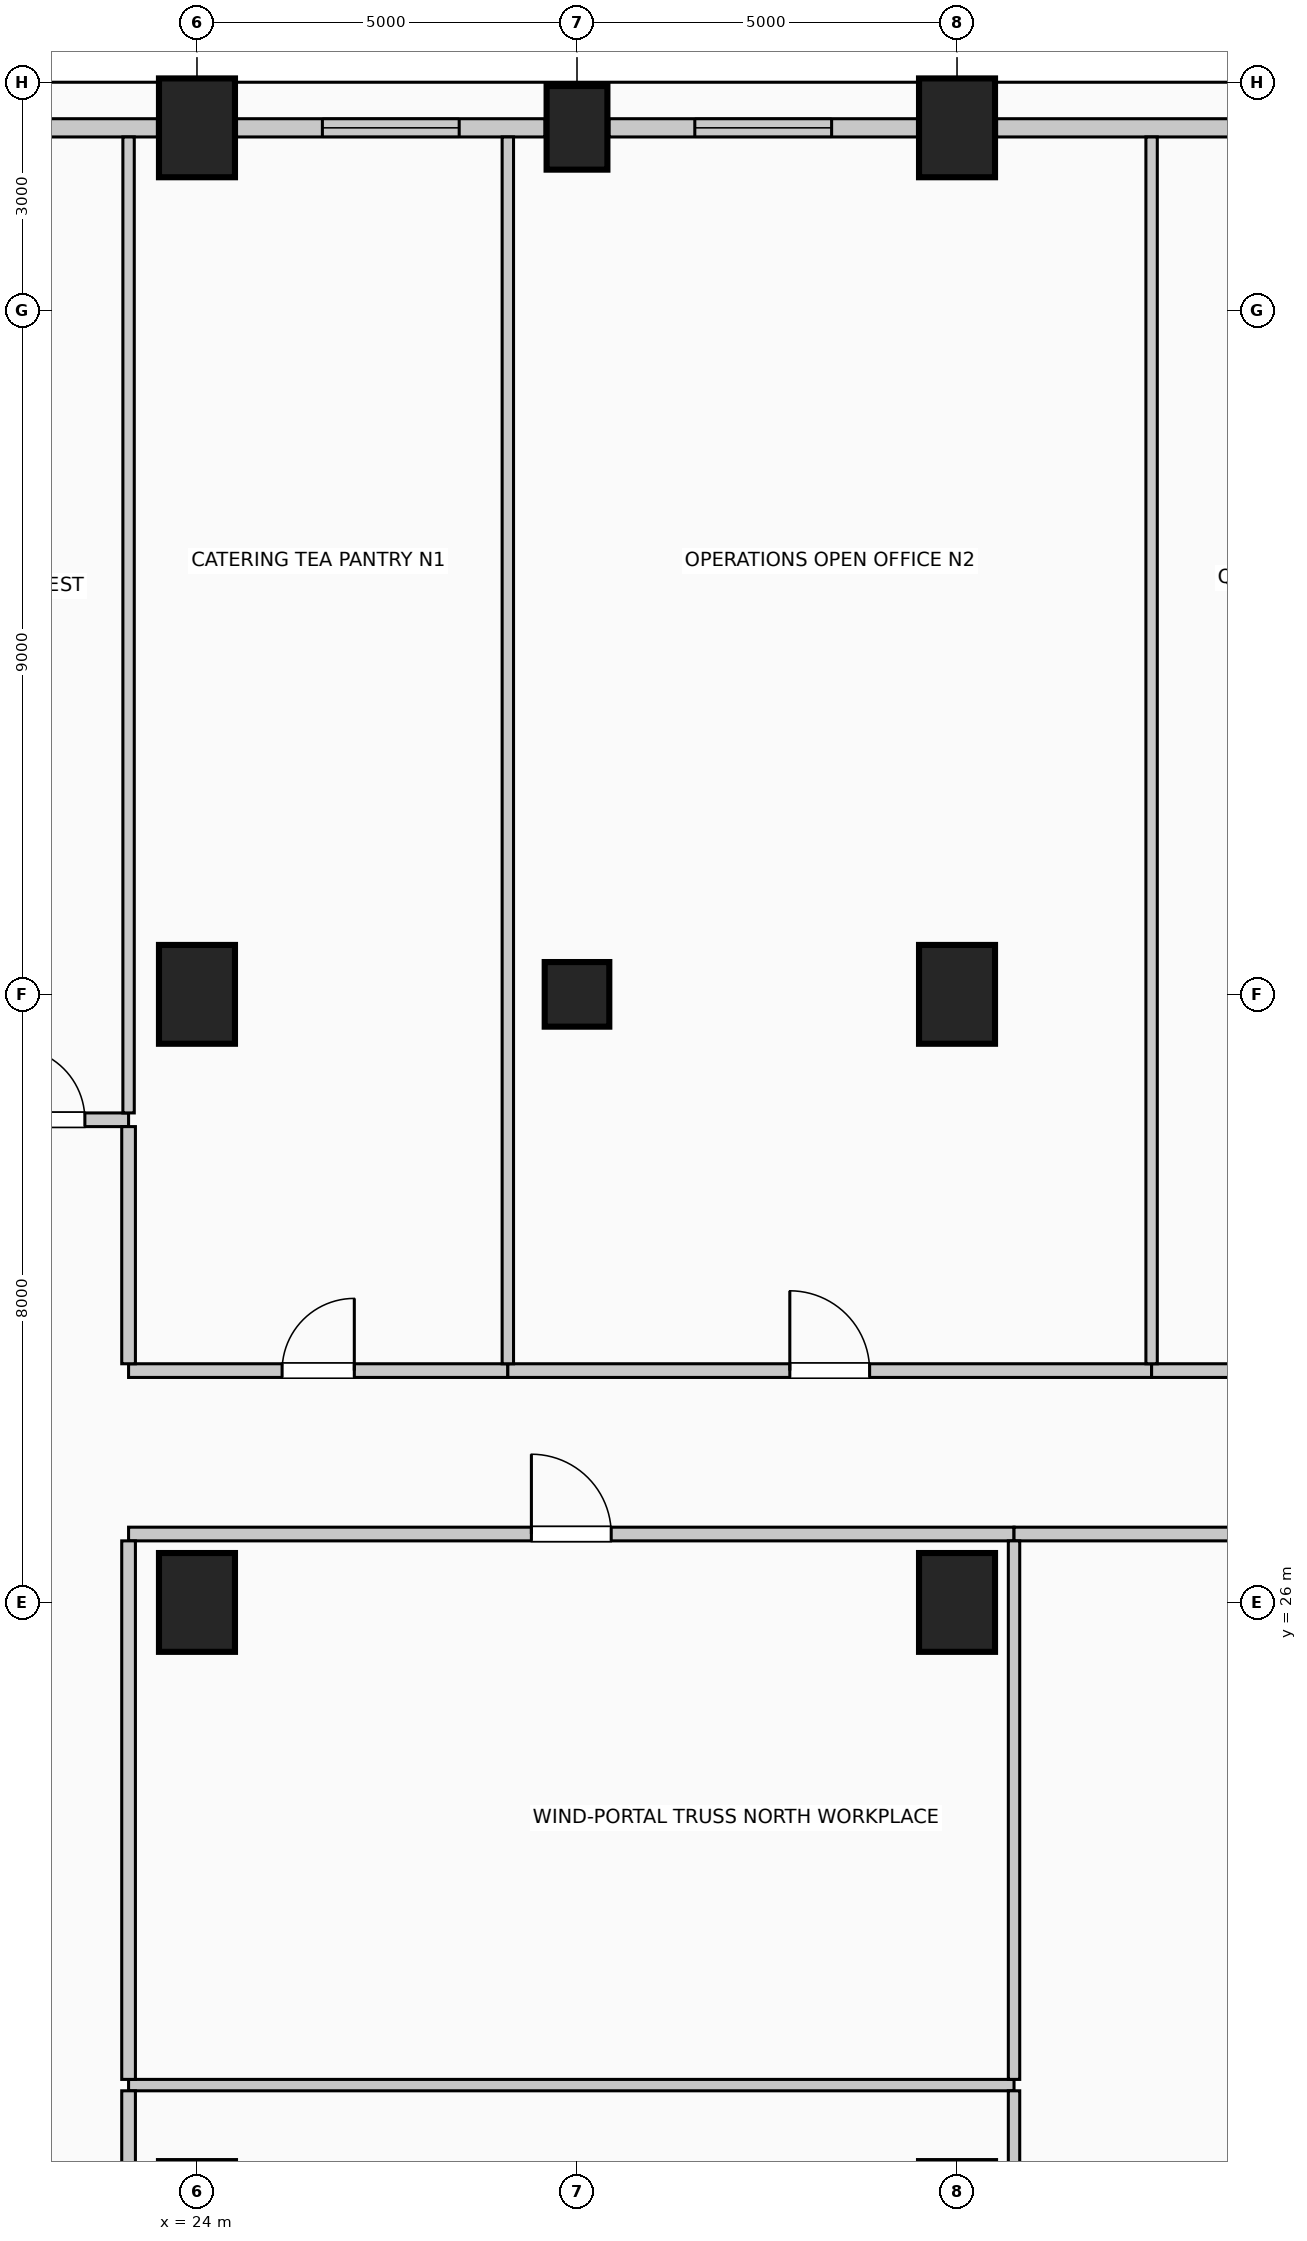
"""IFC4 building model, lengths in metres.
Left out: names, types, materials, properties, quantities, classifications, styles, units other than length and angle.
Written with IfcOpenShell. Run it as: python <this file> out.ifc"""

import sys

from ifc_helpers import new_model, si_unit, direction, frame, frame_2d, origin, origin_2d, place, context, subcontext, project, spatial, rectangle, circle, extrude, element, fill, save


model = new_model("IFC4")
c1 = context("Model", 3, precision=1e-05, world=origin(), true_north=direction((0.0, 1.0)))
c2 = subcontext(c1, "Body", "Model", "MODEL_VIEW")
j1 = project(units=[si_unit("LENGTHUNIT", "METRE"), si_unit("PLANEANGLEUNIT", "RADIAN")], contexts=[c1])
p1 = place(None, origin())
s1 = spatial("IfcSite", under=j1, at=p1, CompositionType="ELEMENT")
p2 = place(p1, origin())
s2 = spatial("IfcBuilding", under=s1, at=p2, CompositionType="ELEMENT")
p3 = place(p2, frame((0.0, 0.0, 214.6)))
s3 = spatial("IfcBuildingStorey", under=s2, at=p3, CompositionType="ELEMENT", Elevation=214.6)
p4 = place(p3, frame((24.0, 45.4, 0.0), z_axis=(0.0, 0.0, 1.0), x_axis=(1.0, 0.0, 0.0)))
e1 = element("IfcColumn", 1, at=p4, inside=s3, PredefinedType="COLUMN", context=c2, shape_type="SweptSolid", body=[
    extrude(rectangle(XDim=1.0, YDim=1.3, at=origin_2d()), origin(), (0.0, 0.0, 1.0), 4.0),
])
p5 = place(p3, frame((29.0, 45.4, 0.0), z_axis=(0.0, 0.0, 1.0), x_axis=(1.0, 0.0, 0.0)))
e2 = element("IfcColumn", 2, at=p5, inside=s3, PredefinedType="COLUMN", context=c2, shape_type="SweptSolid", body=[
    extrude(rectangle(XDim=0.8, YDim=1.1, at=origin_2d()), origin(), (0.0, 0.0, 1.0), 4.0),
])
for number, where, z_axis, x_axis in (
    (3, (34.0, 45.4, 0.0), (0.0, 0.0, 1.0), (1.0, 0.0, 0.0)),
    (4, (24.0, 18.0, 0.0), (0.0, 0.0, 1.0), (1.0, 0.0, 0.0)),
    (5, (34.0, 18.0, 0.0), (0.0, 0.0, 1.0), (1.0, 0.0, 0.0)),
    (6, (24.0, 26.0, 0.0), (0.0, 0.0, 1.0), (1.0, 0.0, 0.0)),
    (7, (34.0, 26.0, 0.0), (0.0, 0.0, 1.0), (1.0, 0.0, 0.0)),
    (8, (24.0, 34.0, 0.0), (0.0, 0.0, 1.0), (1.0, 0.0, 0.0)),
    (9, (34.0, 34.0, 0.0), (0.0, 0.0, 1.0), (1.0, 0.0, 0.0)),
):
    element("IfcColumn", number, at=place(p3, frame(where, z_axis=z_axis, x_axis=x_axis)), inside=s3, PredefinedType="COLUMN", context=c2, shape_type="SweptSolid", body=[
        extrude(rectangle(XDim=1.0, YDim=1.3, at=origin_2d()), origin(), (0.0, 0.0, 1.0), 4.0),
    ])
p6 = place(p3, frame((29.0, 34.0, 0.0), z_axis=(0.0, 0.0, 1.0), x_axis=(1.0, 0.0, 0.0)))
e10 = element("IfcColumn", 10, at=p6, inside=s3, PredefinedType="COLUMN", context=c2, shape_type="SweptSolid", body=[
    extrude(circle(Radius=0.425, at=origin_2d()), origin(), (0.0, 0.0, 1.0), 4.0),
])
p7 = place(p3, frame((16.92, 45.4, 0.0), z_axis=(0.0, 0.0, 1.0), x_axis=(1.0, 0.0, 0.0)))
e11 = element("IfcWall", 11, at=p7, inside=s3, PredefinedType="SOLIDWALL", context=c2, shape_type="SweptSolid", body=[
    extrude(rectangle(XDim=6.56, YDim=0.24, at=frame_2d((3.28, 0.0))), origin(), (0.0, 0.0, 1.0), 3.0),
])
p8 = place(p7, frame((0.987, 0.0, 0.42)))
e12 = element("IfcOpeningElement", 12, at=p8, cuts=e11, PredefinedType="OPENING", context=c2, shape_type="SweptSolid", body=[
    extrude(rectangle(XDim=1.8, YDim=2.2, at=frame_2d((0.9, 1.1))), frame((0.0, 0.13, 0.0), z_axis=(0.0, -1.0, 0.0), x_axis=(1.0, 0.0, 0.0)), (0.0, 0.0, 1.0), 0.26),
])
p9 = place(p3, frame((24.52, 45.4, 0.0), z_axis=(0.0, 0.0, 1.0), x_axis=(1.0, 0.0, 0.0)))
e13 = element("IfcWall", 13, at=p9, inside=s3, PredefinedType="SOLIDWALL", context=c2, shape_type="SweptSolid", body=[
    extrude(rectangle(XDim=4.06, YDim=0.24, at=frame_2d((2.03, 0.0))), origin(), (0.0, 0.0, 1.0), 3.0),
])
p10 = place(p9, frame((1.13, 0.0, 0.42)))
e14 = element("IfcOpeningElement", 14, at=p10, cuts=e13, PredefinedType="OPENING", context=c2, shape_type="SweptSolid", body=[
    extrude(rectangle(XDim=1.8, YDim=2.2, at=frame_2d((0.9, 1.1))), frame((0.0, 0.13, 0.0), z_axis=(0.0, -1.0, 0.0), x_axis=(1.0, 0.0, 0.0)), (0.0, 0.0, 1.0), 0.26),
])
p11 = place(p3, frame((29.42, 45.4, 0.0), z_axis=(0.0, 0.0, 1.0), x_axis=(1.0, 0.0, 0.0)))
e15 = element("IfcWall", 15, at=p11, inside=s3, PredefinedType="SOLIDWALL", context=c2, shape_type="SweptSolid", body=[
    extrude(rectangle(XDim=4.06, YDim=0.24, at=frame_2d((2.03, 0.0))), origin(), (0.0, 0.0, 1.0), 3.0),
])
p12 = place(p11, frame((1.13, 0.0, 0.42)))
e16 = element("IfcOpeningElement", 16, at=p12, cuts=e15, PredefinedType="OPENING", context=c2, shape_type="SweptSolid", body=[
    extrude(rectangle(XDim=1.8, YDim=2.2, at=frame_2d((0.9, 1.1))), frame((0.0, 0.13, 0.0), z_axis=(0.0, -1.0, 0.0), x_axis=(1.0, 0.0, 0.0)), (0.0, 0.0, 1.0), 0.26),
])
p13 = place(p3, frame((34.52, 45.4, 0.0), z_axis=(0.0, 0.0, 1.0), x_axis=(1.0, 0.0, 0.0)))
e17 = element("IfcWall", 17, at=p13, inside=s3, PredefinedType="SOLIDWALL", context=c2, shape_type="SweptSolid", body=[
    extrude(rectangle(XDim=6.56, YDim=0.24, at=frame_2d((3.28, 0.0))), origin(), (0.0, 0.0, 1.0), 3.0),
])
p14 = place(p3, frame((23.1, 19.65, 0.0), z_axis=(0.0, 0.0, 1.0), x_axis=(1.0, 0.0, 0.0)))
e18 = element("IfcWall", 18, at=p14, inside=s3, PredefinedType="PARTITIONING", context=c2, shape_type="SweptSolid", body=[
    extrude(rectangle(XDim=11.65, YDim=0.15, at=frame_2d((5.825, 0.0))), origin(), (0.0, 0.0, 1.0), 3.75),
])
p15 = place(p3, frame((23.1, 26.9, 0.0), z_axis=(0.0, 0.0, 1.0), x_axis=(1.0, 0.0, 0.0)))
e19 = element("IfcWall", 19, at=p15, inside=s3, PredefinedType="PARTITIONING", context=c2, shape_type="SweptSolid", body=[
    extrude(rectangle(XDim=11.65, YDim=0.18, at=frame_2d((5.825, 0.0))), origin(), (0.0, 0.0, 1.0), 3.75),
])
p16 = place(p15, frame((5.3, 0.0, 0.0)))
e20 = element("IfcOpeningElement", 20, at=p16, cuts=e19, PredefinedType="OPENING", context=c2, shape_type="SweptSolid", body=[
    extrude(rectangle(XDim=1.05, YDim=2.15, at=frame_2d((0.525, 1.075))), frame((0.0, 0.1, 0.0), z_axis=(0.0, -1.0, 0.0), x_axis=(1.0, 0.0, 0.0)), (0.0, 0.0, 1.0), 0.2),
])
p17 = place(p3, frame((34.75, 26.9, 0.0), z_axis=(0.0, 0.0, 1.0), x_axis=(1.0, 0.0, 0.0)))
e21 = element("IfcWall", 21, at=p17, inside=s3, PredefinedType="PARTITIONING", context=c2, shape_type="SweptSolid", body=[
    extrude(rectangle(XDim=22.53, YDim=0.18, at=frame_2d((11.265, 0.0))), origin(), (0.0, 0.0, 1.0), 3.75),
])
p18 = place(p3, frame((23.1, 29.05, 0.0), z_axis=(0.0, 0.0, 1.0), x_axis=(1.0, 0.0, 0.0)))
e22 = element("IfcWall", 22, at=p18, inside=s3, PredefinedType="PARTITIONING", context=c2, shape_type="SweptSolid", body=[
    extrude(rectangle(XDim=4.99, YDim=0.18, at=frame_2d((2.495, 0.0))), origin(), (0.0, 0.0, 1.0), 3.75),
])
p19 = place(p18, frame((2.02, 0.0, 0.0)))
e23 = element("IfcOpeningElement", 23, at=p19, cuts=e22, PredefinedType="OPENING", context=c2, shape_type="SweptSolid", body=[
    extrude(rectangle(XDim=0.95, YDim=2.15, at=frame_2d((0.475, 1.075))), frame((0.0, 0.1, 0.0), z_axis=(0.0, -1.0, 0.0), x_axis=(1.0, 0.0, 0.0)), (0.0, 0.0, 1.0), 0.2),
])
p20 = place(p3, frame((28.09, 29.05, 0.0), z_axis=(0.0, 0.0, 1.0), x_axis=(1.0, 0.0, 0.0)))
e24 = element("IfcWall", 24, at=p20, inside=s3, PredefinedType="PARTITIONING", context=c2, shape_type="SweptSolid", body=[
    extrude(rectangle(XDim=8.47, YDim=0.18, at=frame_2d((4.235, 0.0))), origin(), (0.0, 0.0, 1.0), 3.75),
])
p21 = place(p20, frame((3.71, 0.0, 0.0)))
e25 = element("IfcOpeningElement", 25, at=p21, cuts=e24, PredefinedType="OPENING", context=c2, shape_type="SweptSolid", body=[
    extrude(rectangle(XDim=1.05, YDim=2.15, at=frame_2d((0.525, 1.075))), frame((0.0, 0.1, 0.0), z_axis=(0.0, -1.0, 0.0), x_axis=(1.0, 0.0, 0.0)), (0.0, 0.0, 1.0), 0.2),
])
p22 = place(p3, frame((36.56, 29.05, 0.0), z_axis=(0.0, 0.0, 1.0), x_axis=(1.0, 0.0, 0.0)))
e26 = element("IfcWall", 26, at=p22, inside=s3, PredefinedType="PARTITIONING", context=c2, shape_type="SweptSolid", body=[
    extrude(rectangle(XDim=4.99, YDim=0.18, at=frame_2d((2.495, 0.0))), origin(), (0.0, 0.0, 1.0), 3.75),
])
p23 = place(p22, frame((2.02, 0.0, 0.0)))
e27 = element("IfcOpeningElement", 27, at=p23, cuts=e26, PredefinedType="OPENING", context=c2, shape_type="SweptSolid", body=[
    extrude(rectangle(XDim=0.95, YDim=2.15, at=frame_2d((0.475, 1.075))), frame((0.0, 0.1, 0.0), z_axis=(0.0, -1.0, 0.0), x_axis=(1.0, 0.0, 0.0)), (0.0, 0.0, 1.0), 0.2),
])
p24 = place(p3, frame((21.0, 32.35, 0.0), z_axis=(0.0, 0.0, 1.0), x_axis=(1.0, 0.0, 0.0)))
e28 = element("IfcWall", 28, at=p24, inside=s3, PredefinedType="PARTITIONING", context=c2, shape_type="SweptSolid", body=[
    extrude(rectangle(XDim=2.1, YDim=0.18, at=frame_2d((1.05, 0.0))), origin(), (0.0, 0.0, 1.0), 3.75),
])
p25 = place(p24, frame((0.575, 0.0, 0.0)))
e29 = element("IfcOpeningElement", 29, at=p25, cuts=e28, PredefinedType="OPENING", context=c2, shape_type="SweptSolid", body=[
    extrude(rectangle(XDim=0.95, YDim=2.15, at=frame_2d((0.475, 1.075))), frame((0.0, 0.1, 0.0), z_axis=(0.0, -1.0, 0.0), x_axis=(1.0, 0.0, 0.0)), (0.0, 0.0, 1.0), 0.2),
])
p26 = place(p3, frame((23.1, 16.39, 0.0), z_axis=(0.0, 0.0, 1.0), x_axis=(0.0, 1.0, 0.0)))
e30 = element("IfcWall", 30, at=p26, inside=s3, PredefinedType="PARTITIONING", context=c2, shape_type="SweptSolid", body=[
    extrude(rectangle(XDim=3.185, YDim=0.18, at=frame_2d((1.593, 0.0))), origin(), (0.0, 0.0, 1.0), 3.75),
])
p27 = place(p3, frame((23.1, 19.725, 0.0), z_axis=(0.0, 0.0, 1.0), x_axis=(0.0, 1.0, 0.0)))
e31 = element("IfcWall", 31, at=p27, inside=s3, PredefinedType="PARTITIONING", context=c2, shape_type="SweptSolid", body=[
    extrude(rectangle(XDim=7.085, YDim=0.18, at=frame_2d((3.542, 0.0))), origin(), (0.0, 0.0, 1.0), 3.75),
])
p28 = place(p3, frame((23.1, 29.14, 0.0), z_axis=(0.0, 0.0, 1.0), x_axis=(0.0, 1.0, 0.0)))
e32 = element("IfcWall", 32, at=p28, inside=s3, PredefinedType="PARTITIONING", context=c2, shape_type="SweptSolid", body=[
    extrude(rectangle(XDim=3.12, YDim=0.18, at=frame_2d((1.56, 0.0))), origin(), (0.0, 0.0, 1.0), 3.75),
])
p29 = place(p3, frame((23.1, 32.44, 0.0), z_axis=(0.0, 0.0, 1.0), x_axis=(0.0, 1.0, 0.0)))
e33 = element("IfcWall", 33, at=p29, inside=s3, PredefinedType="PARTITIONING", context=c2, shape_type="SweptSolid", body=[
    extrude(rectangle(XDim=12.84, YDim=0.15, at=frame_2d((6.42, 0.0))), origin(), (0.0, 0.0, 1.0), 3.75),
])
p30 = place(p3, frame((28.09, 29.14, 0.0), z_axis=(0.0, 0.0, 1.0), x_axis=(0.0, 1.0, 0.0)))
e34 = element("IfcWall", 34, at=p30, inside=s3, PredefinedType="PARTITIONING", context=c2, shape_type="SweptSolid", body=[
    extrude(rectangle(XDim=16.14, YDim=0.15, at=frame_2d((8.07, 0.0))), origin(), (0.0, 0.0, 1.0), 3.75),
])
p31 = place(p3, frame((34.75, 16.39, 0.0), z_axis=(0.0, 0.0, 1.0), x_axis=(0.0, 1.0, 0.0)))
e35 = element("IfcWall", 35, at=p31, inside=s3, PredefinedType="PARTITIONING", context=c2, shape_type="SweptSolid", body=[
    extrude(rectangle(XDim=3.185, YDim=0.15, at=frame_2d((1.593, 0.0))), origin(), (0.0, 0.0, 1.0), 3.75),
])
p32 = place(p3, frame((34.75, 19.725, 0.0), z_axis=(0.0, 0.0, 1.0), x_axis=(0.0, 1.0, 0.0)))
e36 = element("IfcWall", 36, at=p32, inside=s3, PredefinedType="PARTITIONING", context=c2, shape_type="SweptSolid", body=[
    extrude(rectangle(XDim=7.085, YDim=0.15, at=frame_2d((3.542, 0.0))), origin(), (0.0, 0.0, 1.0), 3.75),
])
p33 = place(p3, frame((36.56, 29.14, 0.0), z_axis=(0.0, 0.0, 1.0), x_axis=(0.0, 1.0, 0.0)))
e37 = element("IfcWall", 37, at=p33, inside=s3, PredefinedType="PARTITIONING", context=c2, shape_type="SweptSolid", body=[
    extrude(rectangle(XDim=16.14, YDim=0.15, at=frame_2d((8.07, 0.0))), origin(), (0.0, 0.0, 1.0), 3.75),
])
p34 = place(p10, origin())
e38 = element("IfcWindow", 38, at=p34, inside=s3, PartitioningType="SINGLE_PANEL", PredefinedType="WINDOW", context=c2, shape_type="SweptSolid", body=[
    extrude(rectangle(XDim=1.8, YDim=2.2, at=frame_2d((0.9, 1.1))), frame((0.0, 0.03, 0.0), z_axis=(0.0, -1.0, 0.0), x_axis=(1.0, 0.0, 0.0)), (0.0, 0.0, 1.0), 0.06),
])
fill(e14, e38)
p35 = place(p12, origin())
e39 = element("IfcWindow", 39, at=p35, inside=s3, PartitioningType="SINGLE_PANEL", PredefinedType="WINDOW", context=c2, shape_type="SweptSolid", body=[
    extrude(rectangle(XDim=1.8, YDim=2.2, at=frame_2d((0.9, 1.1))), frame((0.0, 0.03, 0.0), z_axis=(0.0, -1.0, 0.0), x_axis=(1.0, 0.0, 0.0)), (0.0, 0.0, 1.0), 0.06),
])
fill(e16, e39)
p36 = place(p16, origin())
e40 = element("IfcDoor", 40, at=p36, inside=s3, OperationType="SINGLE_SWING_LEFT", PredefinedType="DOOR", context=c2, shape_type="SweptSolid", body=[
    extrude(rectangle(XDim=1.05, YDim=2.15, at=frame_2d((0.525, 1.075))), frame((0.0, 0.025, 0.0), z_axis=(0.0, -1.0, 0.0), x_axis=(1.0, 0.0, 0.0)), (0.0, 0.0, 1.0), 0.05),
])
fill(e20, e40)
p37 = place(p19, origin())
e41 = element("IfcDoor", 41, at=p37, inside=s3, OperationType="SINGLE_SWING_RIGHT", PredefinedType="DOOR", context=c2, shape_type="SweptSolid", body=[
    extrude(rectangle(XDim=0.95, YDim=2.15, at=frame_2d((0.475, 1.075))), frame((0.0, 0.025, 0.0), z_axis=(0.0, -1.0, 0.0), x_axis=(1.0, 0.0, 0.0)), (0.0, 0.0, 1.0), 0.05),
])
fill(e23, e41)
p38 = place(p21, origin())
e42 = element("IfcDoor", 42, at=p38, inside=s3, OperationType="SINGLE_SWING_LEFT", PredefinedType="DOOR", context=c2, shape_type="SweptSolid", body=[
    extrude(rectangle(XDim=1.05, YDim=2.15, at=frame_2d((0.525, 1.075))), frame((0.0, 0.025, 0.0), z_axis=(0.0, -1.0, 0.0), x_axis=(1.0, 0.0, 0.0)), (0.0, 0.0, 1.0), 0.05),
])
fill(e25, e42)
p39 = place(p25, origin())
e43 = element("IfcDoor", 43, at=p39, inside=s3, OperationType="SINGLE_SWING_LEFT", PredefinedType="DOOR", context=c2, shape_type="SweptSolid", body=[
    extrude(rectangle(XDim=0.95, YDim=2.15, at=frame_2d((0.475, 1.075))), frame((0.0, 0.025, 0.0), z_axis=(0.0, -1.0, 0.0), x_axis=(1.0, 0.0, 0.0)), (0.0, 0.0, 1.0), 0.05),
])
fill(e29, e43)
save(model, sys.argv[1])
